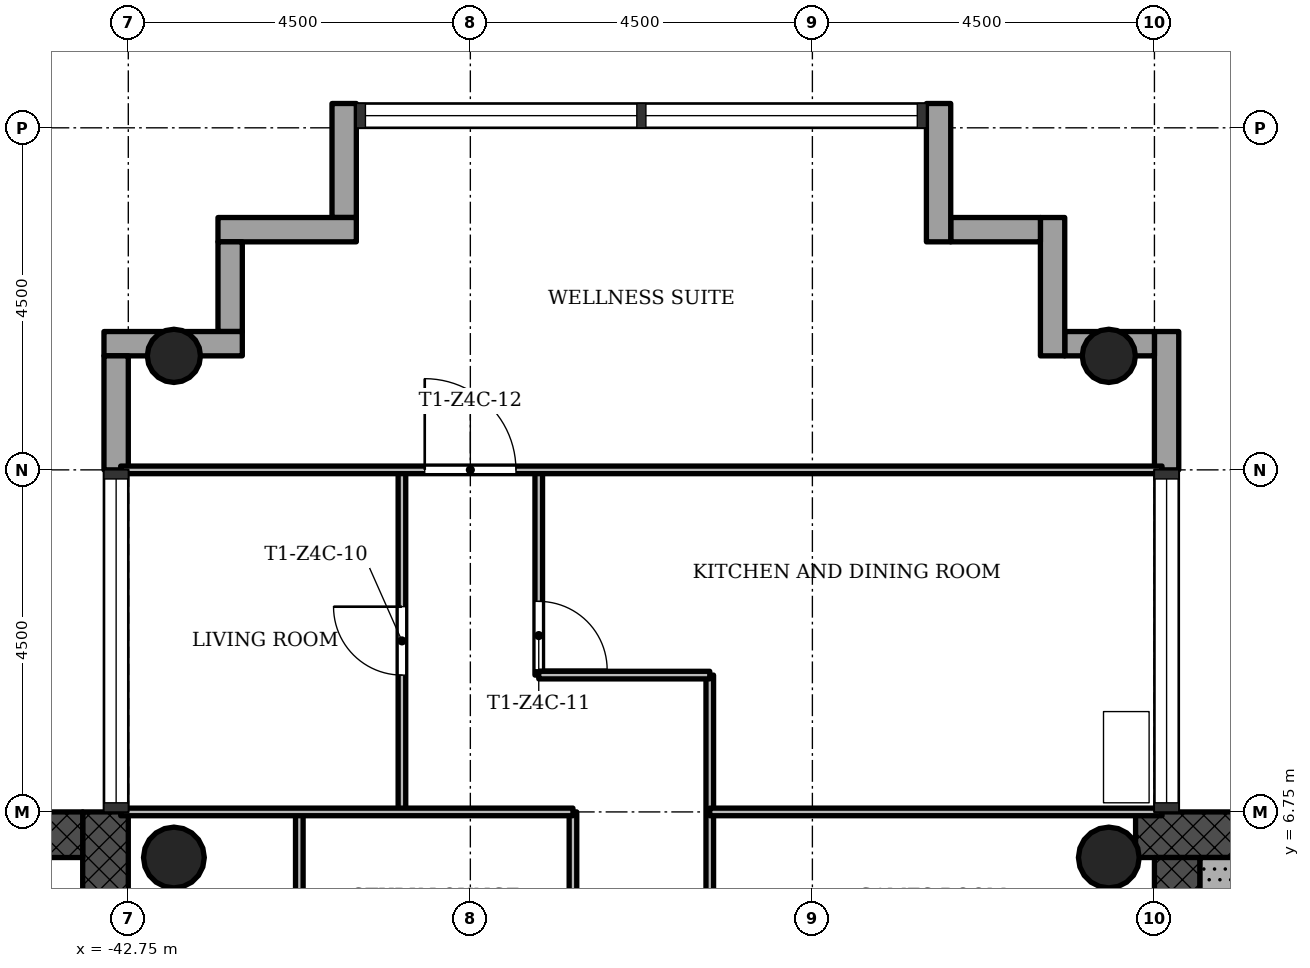
"""IFC4 building model, lengths in metres.
Left out: names, types, materials, properties, quantities, classifications, styles, units other than length and angle.
Written with IfcOpenShell. Run it as: python <this file> out.ifc"""

import sys

from ifc_helpers import new_model, si_unit, direction, frame, frame_2d, origin, origin_2d, place, context, subcontext, project, spatial, rectangle, hollow_circle, extrude, element, fill, save


model = new_model("IFC4")
c1 = context("Model", 3, precision=1e-05, world=origin(), true_north=direction((0.0, 1.0)))
c2 = subcontext(c1, "Body", "Model", "MODEL_VIEW")
j1 = project(units=[si_unit("LENGTHUNIT", "METRE"), si_unit("PLANEANGLEUNIT", "RADIAN")], contexts=[c1])
p1 = place(None, origin())
s1 = spatial("IfcSite", under=j1, at=p1, CompositionType="ELEMENT")
p2 = place(p1, origin())
s2 = spatial("IfcBuilding", under=s1, at=p2, CompositionType="ELEMENT")
p3 = place(p2, frame((0.0, 0.0, 189.2)))
s3 = spatial("IfcBuildingStorey", under=s2, at=p3, CompositionType="ELEMENT", Elevation=189.2)
p4 = place(p3, frame((-20.602, 6.45, 0.0), z_axis=(0.0, 0.0, 1.0), x_axis=(-1.0, 0.0, 0.0)))
e1 = element("IfcWall", 1, at=p4, inside=s3, PredefinedType="SHEAR", context=c2, shape_type="SweptSolid", body=[
    extrude(rectangle(XDim=8.896, YDim=0.6, at=frame_2d((4.448, 0.0))), origin(), (0.0, 0.0, 1.0), 3.4),
])
p5 = place(p3, frame((-28.95, 6.15, 0.0), z_axis=(0.0, 0.0, 1.0), x_axis=(0.0, -1.0, 0.0)))
e2 = element("IfcWall", 2, at=p5, inside=s3, PredefinedType="SHEAR", context=c2, shape_type="SweptSolid", body=[
    extrude(rectangle(XDim=12.9, YDim=0.6, at=frame_2d((6.45, 0.0))), origin(), (0.0, 0.0, 1.0), 3.4),
])
p6 = place(p5, frame((5.25, 0.0, 0.0)))
e3 = element("IfcOpeningElement", 3, at=p6, cuts=e2, PredefinedType="OPENING", context=c2, shape_type="SweptSolid", body=[
    extrude(rectangle(XDim=1.8, YDim=2.1, at=frame_2d((0.9, 1.05))), frame((0.0, 0.31, 0.0), z_axis=(0.0, -1.0, 0.0), x_axis=(1.0, 0.0, 0.0)), (0.0, 0.0, 1.0), 0.62),
])
p7 = place(p3, frame((-43.05, -6.15, 0.0), z_axis=(0.0, 0.0, 1.0), x_axis=(0.0, 1.0, 0.0)))
e4 = element("IfcWall", 4, at=p7, inside=s3, PredefinedType="SHEAR", context=c2, shape_type="SweptSolid", body=[
    extrude(rectangle(XDim=12.9, YDim=0.6, at=frame_2d((6.45, 0.0))), origin(), (0.0, 0.0, 1.0), 3.4),
])
p8 = place(p7, frame((5.25, 0.0, 0.0)))
e5 = element("IfcOpeningElement", 5, at=p8, cuts=e4, PredefinedType="OPENING", context=c2, shape_type="SweptSolid", body=[
    extrude(rectangle(XDim=1.8, YDim=2.1, at=frame_2d((0.9, 1.05))), frame((0.0, 0.31, 0.0), z_axis=(0.0, -1.0, 0.0), x_axis=(1.0, 0.0, 0.0)), (0.0, 0.0, 1.0), 0.62),
])
p9 = place(p3, frame((-43.35, 6.45, 0.0), z_axis=(0.0, 0.0, 1.0), x_axis=(-1.0, 0.0, 0.0)))
e6 = element("IfcWall", 6, at=p9, inside=s3, PredefinedType="SHEAR", context=c2, shape_type="SweptSolid", body=[
    extrude(rectangle(XDim=8.4, YDim=0.6, at=frame_2d((4.2, 0.0))), origin(), (0.0, 0.0, 1.0), 3.4),
])
for number, where, z_axis, x_axis in (
    (7, (-29.85, 12.75, 0.0), (0.0, 0.0, 1.0), (1.0, 0.0, 0.0)),
    (8, (-42.15, 12.75, 0.0), (0.0, 0.0, 1.0), (1.0, 0.0, 0.0)),
):
    element("IfcColumn", number, at=place(p3, frame(where, z_axis=z_axis, x_axis=x_axis)), inside=s3, PredefinedType="COLUMN", context=c2, shape_type="SweptSolid", body=[
        extrude(hollow_circle(Radius=0.35, WallThickness=0.025, at=origin_2d()), origin(), (0.0, 0.0, 1.0), 3.4),
    ])
for number, where, z_axis, x_axis in (
    (9, (-29.85, 6.15, 0.0), (0.0, 0.0, 1.0), (1.0, 0.0, 0.0)),
    (10, (-42.15, 6.15, 0.0), (0.0, 0.0, 1.0), (1.0, 0.0, 0.0)),
):
    element("IfcColumn", number, at=place(p3, frame(where, z_axis=z_axis, x_axis=x_axis)), inside=s3, PredefinedType="COLUMN", context=c2, shape_type="SweptSolid", body=[
        extrude(hollow_circle(Radius=0.4, WallThickness=0.028, at=origin_2d()), origin(), (0.0, 0.0, 1.0), 3.4),
    ])
p10 = place(p3, frame((-29.09, 11.25, -0.3), z_axis=(0.0, 0.0, 1.0), x_axis=(0.0, 1.0, 0.0)))
e11 = element("IfcWall", 11, at=p10, inside=s3, PredefinedType="STANDARD", context=c2, shape_type="SweptSolid", body=[
    extrude(rectangle(XDim=1.82, YDim=0.32, at=frame_2d((0.91, 0.0))), origin(), (0.0, 0.0, 1.0), 3.4),
])
p11 = place(p3, frame((-29.25, 12.91, -0.3), z_axis=(0.0, 0.0, 1.0), x_axis=(-1.0, 0.0, 0.0)))
e12 = element("IfcWall", 12, at=p11, inside=s3, PredefinedType="STANDARD", context=c2, shape_type="SweptSolid", body=[
    extrude(rectangle(XDim=1.18, YDim=0.32, at=frame_2d((0.59, 0.0))), origin(), (0.0, 0.0, 1.0), 3.4),
])
p12 = place(p3, frame((-30.59, 12.75, -0.3), z_axis=(0.0, 0.0, 1.0), x_axis=(0.0, 1.0, 0.0)))
e13 = element("IfcWall", 13, at=p12, inside=s3, PredefinedType="STANDARD", context=c2, shape_type="SweptSolid", body=[
    extrude(rectangle(XDim=1.82, YDim=0.32, at=frame_2d((0.91, 0.0))), origin(), (0.0, 0.0, 1.0), 3.4),
])
p13 = place(p3, frame((-30.75, 14.41, -0.3), z_axis=(0.0, 0.0, 1.0), x_axis=(-1.0, 0.0, 0.0)))
e14 = element("IfcWall", 14, at=p13, inside=s3, PredefinedType="STANDARD", context=c2, shape_type="SweptSolid", body=[
    extrude(rectangle(XDim=1.18, YDim=0.32, at=frame_2d((0.59, 0.0))), origin(), (0.0, 0.0, 1.0), 3.4),
])
p14 = place(p3, frame((-32.09, 14.25, -0.3), z_axis=(0.0, 0.0, 1.0), x_axis=(0.0, 1.0, 0.0)))
e15 = element("IfcWall", 15, at=p14, inside=s3, PredefinedType="STANDARD", context=c2, shape_type="SweptSolid", body=[
    extrude(rectangle(XDim=1.82, YDim=0.32, at=frame_2d((0.91, 0.0))), origin(), (0.0, 0.0, 1.0), 3.4),
])
p15 = place(p3, frame((-39.91, 16.07, -0.3), z_axis=(0.0, 0.0, 1.0), x_axis=(0.0, -1.0, 0.0)))
e16 = element("IfcWall", 16, at=p15, inside=s3, PredefinedType="STANDARD", context=c2, shape_type="SweptSolid", body=[
    extrude(rectangle(XDim=1.5, YDim=0.32, at=frame_2d((0.75, 0.0))), origin(), (0.0, 0.0, 1.0), 3.4),
])
p16 = place(p3, frame((-39.75, 14.41, -0.3), z_axis=(0.0, 0.0, 1.0), x_axis=(-1.0, 0.0, 0.0)))
e17 = element("IfcWall", 17, at=p16, inside=s3, PredefinedType="STANDARD", context=c2, shape_type="SweptSolid", body=[
    extrude(rectangle(XDim=1.82, YDim=0.32, at=frame_2d((0.91, 0.0))), origin(), (0.0, 0.0, 1.0), 3.4),
])
p17 = place(p3, frame((-41.41, 14.25, -0.3), z_axis=(0.0, 0.0, 1.0), x_axis=(0.0, -1.0, 0.0)))
e18 = element("IfcWall", 18, at=p17, inside=s3, PredefinedType="STANDARD", context=c2, shape_type="SweptSolid", body=[
    extrude(rectangle(XDim=1.18, YDim=0.32, at=frame_2d((0.59, 0.0))), origin(), (0.0, 0.0, 1.0), 3.4),
])
p18 = place(p3, frame((-41.25, 12.91, -0.3), z_axis=(0.0, 0.0, 1.0), x_axis=(-1.0, 0.0, 0.0)))
e19 = element("IfcWall", 19, at=p18, inside=s3, PredefinedType="STANDARD", context=c2, shape_type="SweptSolid", body=[
    extrude(rectangle(XDim=1.82, YDim=0.32, at=frame_2d((0.91, 0.0))), origin(), (0.0, 0.0, 1.0), 3.4),
])
p19 = place(p3, frame((-42.91, 12.75, -0.3), z_axis=(0.0, 0.0, 1.0), x_axis=(0.0, -1.0, 0.0)))
e20 = element("IfcWall", 20, at=p19, inside=s3, PredefinedType="STANDARD", context=c2, shape_type="SweptSolid", body=[
    extrude(rectangle(XDim=1.5, YDim=0.32, at=frame_2d((0.75, 0.0))), origin(), (0.0, 0.0, 1.0), 3.4),
])
p20 = place(p3, frame((-40.5, 1.5, 0.0), z_axis=(0.0, 0.0, 1.0), x_axis=(0.0, 1.0, 0.0)))
e21 = element("IfcWall", 21, at=p20, inside=s3, PredefinedType="PARTITIONING", context=c2, shape_type="SweptSolid", body=[
    extrude(rectangle(XDim=5.25, YDim=0.1, at=frame_2d((2.625, 0.0))), origin(), (0.0, 0.0, 1.0), 3.0),
])
p21 = place(p20, frame((1.05, 0.0, 0.0)))
e22 = element("IfcOpeningElement", 22, at=p21, cuts=e21, PredefinedType="OPENING", context=c2, shape_type="SweptSolid", body=[
    extrude(rectangle(XDim=0.9, YDim=2.1, at=frame_2d((0.45, 1.05))), frame((0.0, 0.06, 0.0), z_axis=(0.0, -1.0, 0.0), x_axis=(1.0, 0.0, 0.0)), (0.0, 0.0, 1.0), 0.12),
])
p22 = place(p3, frame((-39.15, 6.75, 0.0), z_axis=(0.0, 0.0, 1.0), x_axis=(0.0, 1.0, 0.0)))
e23 = element("IfcWall", 23, at=p22, inside=s3, PredefinedType="PARTITIONING", context=c2, shape_type="SweptSolid", body=[
    extrude(rectangle(XDim=4.5, YDim=0.1, at=frame_2d((2.25, 0.0))), origin(), (0.0, 0.0, 1.0), 3.0),
])
p23 = place(p22, frame((1.8, 0.0, 0.0)))
e24 = element("IfcOpeningElement", 24, at=p23, cuts=e23, PredefinedType="OPENING", context=c2, shape_type="SweptSolid", body=[
    extrude(rectangle(XDim=0.9, YDim=2.1, at=frame_2d((0.45, 1.05))), frame((0.0, 0.06, 0.0), z_axis=(0.0, -1.0, 0.0), x_axis=(1.0, 0.0, 0.0)), (0.0, 0.0, 1.0), 0.12),
])
p24 = place(p3, frame((-37.35, 8.55, 0.0), z_axis=(0.0, 0.0, 1.0), x_axis=(0.0, 1.0, 0.0)))
e25 = element("IfcWall", 25, at=p24, inside=s3, PredefinedType="PARTITIONING", context=c2, shape_type="SweptSolid", body=[
    extrude(rectangle(XDim=2.7, YDim=0.1, at=frame_2d((1.35, 0.0))), origin(), (0.0, 0.0, 1.0), 3.0),
])
p25 = place(p24, frame((0.07, 0.0, 0.0)))
e26 = element("IfcOpeningElement", 26, at=p25, cuts=e25, PredefinedType="OPENING", context=c2, shape_type="SweptSolid", body=[
    extrude(rectangle(XDim=0.9, YDim=2.1, at=frame_2d((0.45, 1.05))), frame((0.0, 0.06, 0.0), z_axis=(0.0, -1.0, 0.0), x_axis=(1.0, 0.0, 0.0)), (0.0, 0.0, 1.0), 0.12),
])
p26 = place(p3, frame((-36.9, 4.5, 0.0), z_axis=(0.0, 0.0, 1.0), x_axis=(0.0, 1.0, 0.0)))
e27 = element("IfcWall", 27, at=p26, inside=s3, PredefinedType="PARTITIONING", context=c2, shape_type="SweptSolid", body=[
    extrude(rectangle(XDim=2.25, YDim=0.1, at=frame_2d((1.125, 0.0))), origin(), (0.0, 0.0, 1.0), 3.0),
])
p27 = place(p3, frame((-35.1, 4.5, 0.0), z_axis=(0.0, 0.0, 1.0), x_axis=(0.0, 1.0, 0.0)))
e28 = element("IfcWall", 28, at=p27, inside=s3, PredefinedType="PARTITIONING", context=c2, shape_type="SweptSolid", body=[
    extrude(rectangle(XDim=4.05, YDim=0.1, at=frame_2d((2.025, 0.0))), origin(), (0.0, 0.0, 1.0), 3.0),
])
for number, where, z_axis, x_axis in (
    (29, (-42.85, 6.75, 0.0), (0.0, 0.0, 1.0), (1.0, 0.0, 0.0)),
    (30, (-35.1, 6.75, 0.0), (0.0, 0.0, 1.0), (1.0, 0.0, 0.0)),
):
    element("IfcWall", number, at=place(p3, frame(where, z_axis=z_axis, x_axis=x_axis)), inside=s3, PredefinedType="PARTITIONING", context=c2, shape_type="SweptSolid", body=[
        extrude(rectangle(XDim=5.95, YDim=0.1, at=frame_2d((2.975, 0.0))), origin(), (0.0, 0.0, 1.0), 3.0),
    ])
p28 = place(p3, frame((-37.35, 8.55, 0.0), z_axis=(0.0, 0.0, 1.0), x_axis=(1.0, 0.0, 0.0)))
e31 = element("IfcWall", 31, at=p28, inside=s3, PredefinedType="PARTITIONING", context=c2, shape_type="SweptSolid", body=[
    extrude(rectangle(XDim=2.25, YDim=0.1, at=frame_2d((1.125, 0.0))), origin(), (0.0, 0.0, 1.0), 3.0),
])
p29 = place(p3, frame((-42.85, 11.25, 0.0), z_axis=(0.0, 0.0, 1.0), x_axis=(1.0, 0.0, 0.0)))
e32 = element("IfcWall", 32, at=p29, inside=s3, PredefinedType="PARTITIONING", context=c2, shape_type="SweptSolid", body=[
    extrude(rectangle(XDim=13.7, YDim=0.1, at=frame_2d((6.85, 0.0))), origin(), (0.0, 0.0, 1.0), 3.0),
])
p30 = place(p29, frame((4.0, 0.0, 0.0)))
e33 = element("IfcOpeningElement", 33, at=p30, cuts=e32, PredefinedType="OPENING", context=c2, shape_type="SweptSolid", body=[
    extrude(rectangle(XDim=1.2, YDim=2.1, at=frame_2d((0.6, 1.05))), frame((0.0, 0.06, 0.0), z_axis=(0.0, -1.0, 0.0), x_axis=(1.0, 0.0, 0.0)), (0.0, 0.0, 1.0), 0.12),
])
p31 = place(p3, frame((-28.35, 1.85, 0.0), z_axis=(0.0, 0.0, 1.0), x_axis=(0.0, 1.0, 0.0)))
e34 = element("IfcWall", 34, at=p31, inside=s3, PredefinedType="SHEAR", context=c2, shape_type="SweptSolid", body=[
    extrude(rectangle(XDim=4.3, YDim=0.6, at=frame_2d((2.15, 0.0))), origin(), (0.0, 0.0, 1.0), 3.4),
])
p32 = place(p23, origin())
e35 = element("IfcDoor", 35, at=p32, inside=s3, OperationType="SINGLE_SWING_LEFT", PredefinedType="DOOR", context=c2, shape_type="SweptSolid", body=[
    extrude(rectangle(XDim=0.9, YDim=2.1, at=frame_2d((0.45, 1.05))), frame((0.0, 0.025, 0.0), z_axis=(0.0, -1.0, 0.0), x_axis=(1.0, 0.0, 0.0)), (0.0, 0.0, 1.0), 0.05),
])
fill(e24, e35)
p33 = place(p25, origin())
e36 = element("IfcDoor", 36, at=p33, inside=s3, OperationType="SINGLE_SWING_LEFT", PredefinedType="DOOR", context=c2, shape_type="SweptSolid", body=[
    extrude(rectangle(XDim=0.9, YDim=2.1, at=frame_2d((0.45, 1.05))), frame((0.0, 0.025, 0.0), z_axis=(0.0, -1.0, 0.0), x_axis=(1.0, 0.0, 0.0)), (0.0, 0.0, 1.0), 0.05),
])
fill(e26, e36)
p34 = place(p30, origin())
e37 = element("IfcDoor", 37, at=p34, inside=s3, OperationType="SINGLE_SWING_RIGHT", PredefinedType="DOOR", context=c2, shape_type="SweptSolid", body=[
    extrude(rectangle(XDim=1.2, YDim=2.1, at=frame_2d((0.6, 1.05))), frame((0.0, 0.025, 0.0), z_axis=(0.0, -1.0, 0.0), x_axis=(1.0, 0.0, 0.0)), (0.0, 0.0, 1.0), 0.05),
])
fill(e33, e37)
save(model, sys.argv[1])
